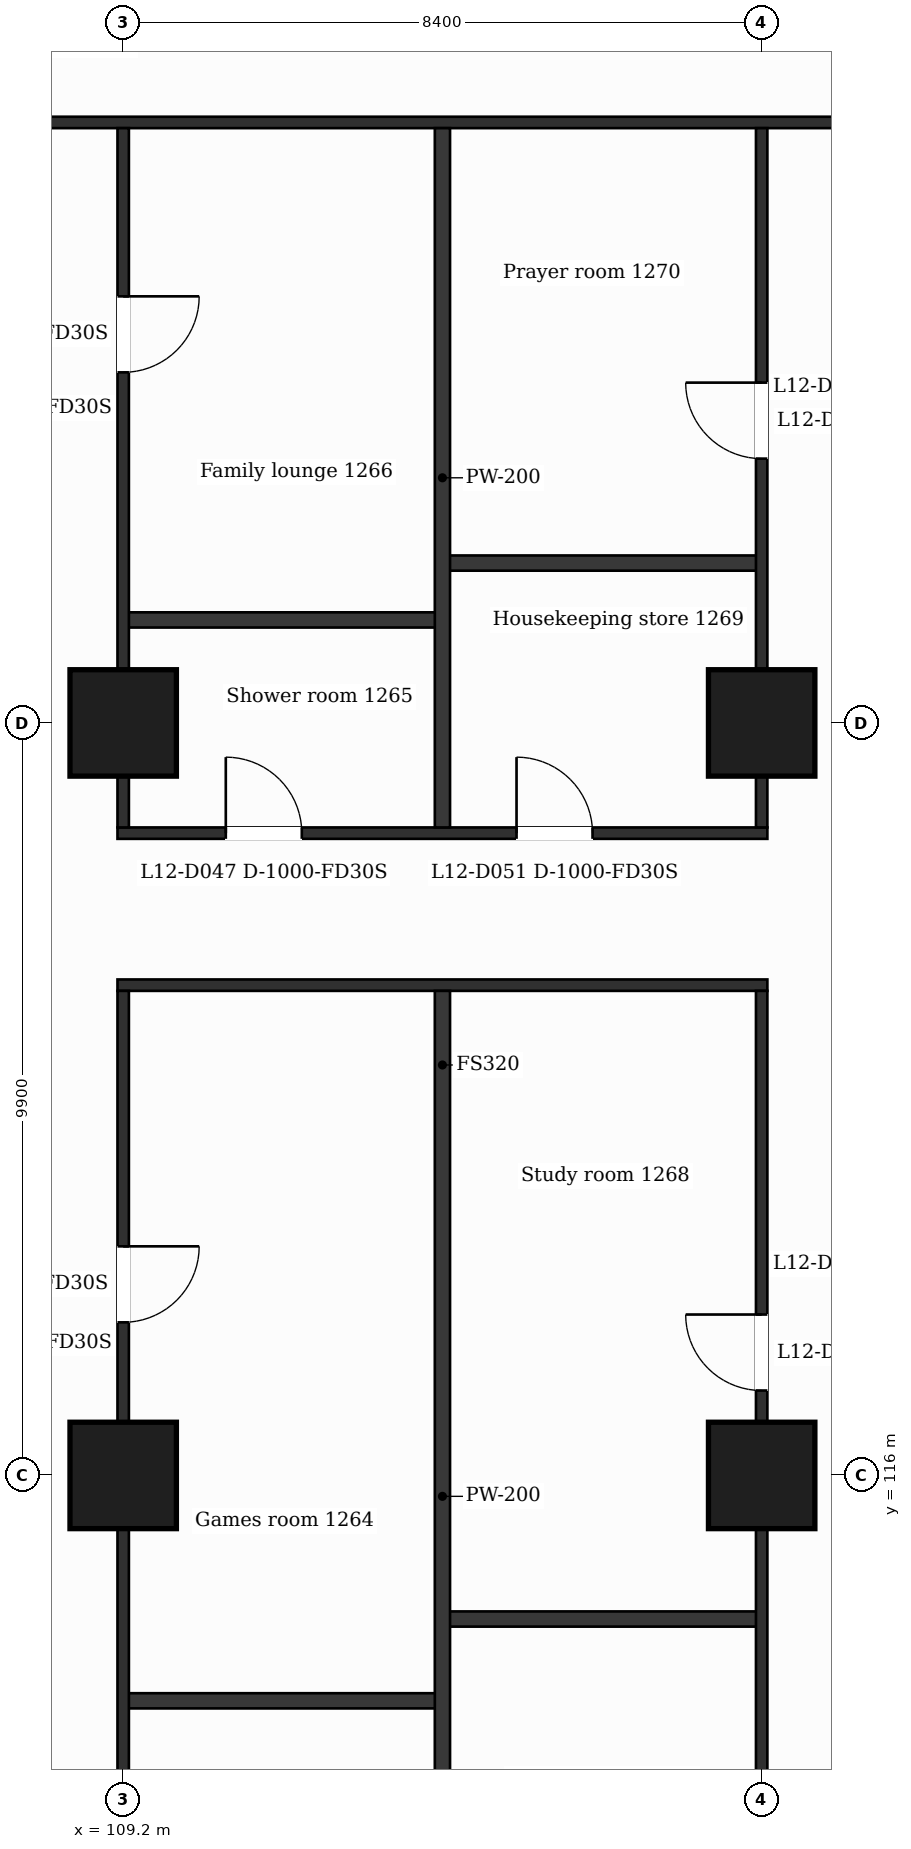
"""IFC4 building model, lengths in metres.
Left out: names, types, materials, properties, quantities, classifications, styles, units other than length and angle.
Written with IfcOpenShell. Run it as: python <this file> out.ifc"""

import sys

from ifc_helpers import new_model, si_unit, direction, frame, frame_2d, origin, origin_2d, place, context, subcontext, project, spatial, rectangle, extrude, element, fill, save


model = new_model("IFC4")
c1 = context("Model", 3, precision=1e-05, world=origin(), true_north=direction((0.0, 1.0)))
c2 = subcontext(c1, "Body", "Model", "MODEL_VIEW")
j1 = project(units=[si_unit("LENGTHUNIT", "METRE"), si_unit("PLANEANGLEUNIT", "RADIAN")], contexts=[c1])
p1 = place(None, origin())
s1 = spatial("IfcSite", under=j1, at=p1, CompositionType="ELEMENT")
p2 = place(p1, origin())
s2 = spatial("IfcBuilding", under=s1, at=p2, CompositionType="ELEMENT")
p3 = place(p2, frame((0.0, 0.0, 60.0)))
s3 = spatial("IfcBuildingStorey", under=s2, at=p3, CompositionType="ELEMENT", Elevation=60.0)
for number, where, z_axis, x_axis in (
    (1, (109.2, 116.0, 0.0), (0.0, 0.0, 1.0), (1.0, 0.0, 0.0)),
    (2, (117.6, 116.0, 0.0), (0.0, 0.0, 1.0), (1.0, 0.0, 0.0)),
    (3, (109.2, 125.9, 0.0), (0.0, 0.0, 1.0), (1.0, 0.0, 0.0)),
    (4, (117.6, 125.9, 0.0), (0.0, 0.0, 1.0), (1.0, 0.0, 0.0)),
):
    element("IfcColumn", number, at=place(p3, frame(where, z_axis=z_axis, x_axis=x_axis)), inside=s3, PredefinedType="COLUMN", context=c2, shape_type="SweptSolid", body=[
        extrude(rectangle(XDim=1.4, YDim=1.4, at=origin_2d()), origin(), (0.0, 0.0, 1.0), 3.5),
    ])
p4 = place(p3, frame((109.2, 113.035, 0.0), z_axis=(0.0, 0.0, 1.0), x_axis=(1.0, 0.0, 0.0)))
e5 = element("IfcWall", 5, at=p4, inside=s3, PredefinedType="PARTITIONING", context=c2, shape_type="SweptSolid", body=[
    extrude(rectangle(XDim=4.2, YDim=0.2, at=frame_2d((2.1, 0.0))), origin(), (0.0, 0.0, 1.0), 3.18),
])
p5 = place(p3, frame((113.4, 114.111, 0.0), z_axis=(0.0, 0.0, 1.0), x_axis=(1.0, 0.0, 0.0)))
e6 = element("IfcWall", 6, at=p5, inside=s3, PredefinedType="PARTITIONING", context=c2, shape_type="SweptSolid", body=[
    extrude(rectangle(XDim=4.2, YDim=0.2, at=frame_2d((2.1, 0.0))), origin(), (0.0, 0.0, 1.0), 3.18),
])
p6 = place(p3, frame((109.125, 122.45, 0.0), z_axis=(0.0, 0.0, 1.0), x_axis=(1.0, 0.0, 0.0)))
e7 = element("IfcWall", 7, at=p6, inside=s3, PredefinedType="PARTITIONING", context=c2, shape_type="SweptSolid", body=[
    extrude(rectangle(XDim=8.55, YDim=0.15, at=frame_2d((4.275, 0.0))), origin(), (0.0, 0.0, 1.0), 3.18),
])
p7 = place(p3, frame((109.125, 124.45, 0.0), z_axis=(0.0, 0.0, 1.0), x_axis=(1.0, 0.0, 0.0)))
e8 = element("IfcWall", 8, at=p7, inside=s3, PredefinedType="PARTITIONING", context=c2, shape_type="SweptSolid", body=[
    extrude(rectangle(XDim=8.55, YDim=0.15, at=frame_2d((4.275, 0.0))), origin(), (0.0, 0.0, 1.0), 3.18),
])
p8 = place(p7, frame((1.425, 0.0, 0.0)))
e9 = element("IfcOpeningElement", 9, at=p8, cuts=e8, PredefinedType="OPENING", context=c2, shape_type="SweptSolid", body=[
    extrude(rectangle(XDim=1.0, YDim=2.1, at=frame_2d((0.5, 1.05))), frame((0.0, 0.085, 0.0), z_axis=(0.0, -1.0, 0.0), x_axis=(1.0, 0.0, 0.0)), (0.0, 0.0, 1.0), 0.17),
])
p9 = place(p7, frame((5.25, 0.0, 0.0)))
e10 = element("IfcOpeningElement", 10, at=p9, cuts=e8, PredefinedType="OPENING", context=c2, shape_type="SweptSolid", body=[
    extrude(rectangle(XDim=1.0, YDim=2.1, at=frame_2d((0.5, 1.05))), frame((0.0, 0.085, 0.0), z_axis=(0.0, -1.0, 0.0), x_axis=(1.0, 0.0, 0.0)), (0.0, 0.0, 1.0), 0.17),
])
p10 = place(p3, frame((109.2, 127.255, 0.0), z_axis=(0.0, 0.0, 1.0), x_axis=(1.0, 0.0, 0.0)))
e11 = element("IfcWall", 11, at=p10, inside=s3, PredefinedType="PARTITIONING", context=c2, shape_type="SweptSolid", body=[
    extrude(rectangle(XDim=4.2, YDim=0.2, at=frame_2d((2.1, 0.0))), origin(), (0.0, 0.0, 1.0), 3.18),
])
p11 = place(p3, frame((113.4, 128.003, 0.0), z_axis=(0.0, 0.0, 1.0), x_axis=(1.0, 0.0, 0.0)))
e12 = element("IfcWall", 12, at=p11, inside=s3, PredefinedType="PARTITIONING", context=c2, shape_type="SweptSolid", body=[
    extrude(rectangle(XDim=4.2, YDim=0.2, at=frame_2d((2.1, 0.0))), origin(), (0.0, 0.0, 1.0), 3.18),
])
p12 = place(p3, frame((100.725, 133.8, 0.0), z_axis=(0.0, 0.0, 1.0), x_axis=(1.0, 0.0, 0.0)))
e13 = element("IfcWall", 13, at=p12, inside=s3, PredefinedType="PARTITIONING", context=c2, shape_type="SweptSolid", body=[
    extrude(rectangle(XDim=25.35, YDim=0.15, at=frame_2d((12.675, 0.0))), origin(), (0.0, 0.0, 1.0), 3.18),
])
p13 = place(p3, frame((109.2, 109.075, 0.0), z_axis=(0.0, 0.0, 1.0), x_axis=(0.0, 1.0, 0.0)))
e14 = element("IfcWall", 14, at=p13, inside=s3, PredefinedType="PARTITIONING", context=c2, shape_type="SweptSolid", body=[
    extrude(rectangle(XDim=13.3, YDim=0.15, at=frame_2d((6.65, 0.0))), origin(), (0.0, 0.0, 1.0), 3.18),
])
p14 = place(p13, frame((8.939, 0.0, 0.0)))
e15 = element("IfcOpeningElement", 15, at=p14, cuts=e14, PredefinedType="OPENING", context=c2, shape_type="SweptSolid", body=[
    extrude(rectangle(XDim=1.0, YDim=2.1, at=frame_2d((0.5, 1.05))), frame((0.0, 0.085, 0.0), z_axis=(0.0, -1.0, 0.0), x_axis=(1.0, 0.0, 0.0)), (0.0, 0.0, 1.0), 0.17),
])
p15 = place(p3, frame((109.2, 124.525, 0.0), z_axis=(0.0, 0.0, 1.0), x_axis=(0.0, 1.0, 0.0)))
e16 = element("IfcWall", 16, at=p15, inside=s3, PredefinedType="PARTITIONING", context=c2, shape_type="SweptSolid", body=[
    extrude(rectangle(XDim=9.2, YDim=0.15, at=frame_2d((4.6, 0.0))), origin(), (0.0, 0.0, 1.0), 3.18),
])
p16 = place(p15, frame((5.987, 0.0, 0.0)))
e17 = element("IfcOpeningElement", 17, at=p16, cuts=e16, PredefinedType="OPENING", context=c2, shape_type="SweptSolid", body=[
    extrude(rectangle(XDim=1.0, YDim=2.1, at=frame_2d((0.5, 1.05))), frame((0.0, 0.085, 0.0), z_axis=(0.0, -1.0, 0.0), x_axis=(1.0, 0.0, 0.0)), (0.0, 0.0, 1.0), 0.17),
])
p17 = place(p3, frame((113.4, 109.075, 0.0), z_axis=(0.0, 0.0, 1.0), x_axis=(0.0, 1.0, 0.0)))
e18 = element("IfcWall", 18, at=p17, inside=s3, PredefinedType="PARTITIONING", context=c2, shape_type="SweptSolid", body=[
    extrude(rectangle(XDim=13.3, YDim=0.2, at=frame_2d((6.65, 0.0))), origin(), (0.0, 0.0, 1.0), 3.18),
])
p18 = place(p3, frame((113.4, 124.525, 0.0), z_axis=(0.0, 0.0, 1.0), x_axis=(0.0, 1.0, 0.0)))
e19 = element("IfcWall", 19, at=p18, inside=s3, PredefinedType="PARTITIONING", context=c2, shape_type="SweptSolid", body=[
    extrude(rectangle(XDim=9.2, YDim=0.2, at=frame_2d((4.6, 0.0))), origin(), (0.0, 0.0, 1.0), 3.18),
])
p19 = place(p3, frame((117.6, 109.075, 0.0), z_axis=(0.0, 0.0, 1.0), x_axis=(0.0, 1.0, 0.0)))
e20 = element("IfcWall", 20, at=p19, inside=s3, PredefinedType="PARTITIONING", context=c2, shape_type="SweptSolid", body=[
    extrude(rectangle(XDim=13.3, YDim=0.15, at=frame_2d((6.65, 0.0))), origin(), (0.0, 0.0, 1.0), 3.18),
])
p20 = place(p19, frame((8.042, 0.0, 0.0)))
e21 = element("IfcOpeningElement", 21, at=p20, cuts=e20, PredefinedType="OPENING", context=c2, shape_type="SweptSolid", body=[
    extrude(rectangle(XDim=1.0, YDim=2.1, at=frame_2d((0.5, 1.05))), frame((0.0, 0.085, 0.0), z_axis=(0.0, -1.0, 0.0), x_axis=(1.0, 0.0, 0.0)), (0.0, 0.0, 1.0), 0.17),
])
p21 = place(p3, frame((117.6, 124.525, 0.0), z_axis=(0.0, 0.0, 1.0), x_axis=(0.0, 1.0, 0.0)))
e22 = element("IfcWall", 22, at=p21, inside=s3, PredefinedType="PARTITIONING", context=c2, shape_type="SweptSolid", body=[
    extrude(rectangle(XDim=9.2, YDim=0.15, at=frame_2d((4.6, 0.0))), origin(), (0.0, 0.0, 1.0), 3.18),
])
p22 = place(p21, frame((4.852, 0.0, 0.0)))
e23 = element("IfcOpeningElement", 23, at=p22, cuts=e22, PredefinedType="OPENING", context=c2, shape_type="SweptSolid", body=[
    extrude(rectangle(XDim=1.0, YDim=2.1, at=frame_2d((0.5, 1.05))), frame((0.0, 0.085, 0.0), z_axis=(0.0, -1.0, 0.0), x_axis=(1.0, 0.0, 0.0)), (0.0, 0.0, 1.0), 0.17),
])
p23 = place(p14, origin())
e24 = element("IfcDoor", 24, at=p23, inside=s3, OperationType="SINGLE_SWING_RIGHT", PredefinedType="DOOR", context=c2, shape_type="SweptSolid", body=[
    extrude(rectangle(XDim=1.0, YDim=2.1, at=frame_2d((0.5, 1.05))), frame((0.0, 0.025, 0.0), z_axis=(0.0, -1.0, 0.0), x_axis=(1.0, 0.0, 0.0)), (0.0, 0.0, 1.0), 0.05),
])
fill(e15, e24)
p24 = place(p8, origin())
e25 = element("IfcDoor", 25, at=p24, inside=s3, OperationType="SINGLE_SWING_LEFT", PredefinedType="DOOR", context=c2, shape_type="SweptSolid", body=[
    extrude(rectangle(XDim=1.0, YDim=2.1, at=frame_2d((0.5, 1.05))), frame((0.0, 0.025, 0.0), z_axis=(0.0, -1.0, 0.0), x_axis=(1.0, 0.0, 0.0)), (0.0, 0.0, 1.0), 0.05),
])
fill(e9, e25)
p25 = place(p16, origin())
e26 = element("IfcDoor", 26, at=p25, inside=s3, OperationType="SINGLE_SWING_RIGHT", PredefinedType="DOOR", context=c2, shape_type="SweptSolid", body=[
    extrude(rectangle(XDim=1.0, YDim=2.1, at=frame_2d((0.5, 1.05))), frame((0.0, 0.025, 0.0), z_axis=(0.0, -1.0, 0.0), x_axis=(1.0, 0.0, 0.0)), (0.0, 0.0, 1.0), 0.05),
])
fill(e17, e26)
p26 = place(p20, origin())
e27 = element("IfcDoor", 27, at=p26, inside=s3, OperationType="SINGLE_SWING_RIGHT", PredefinedType="DOOR", context=c2, shape_type="SweptSolid", body=[
    extrude(rectangle(XDim=1.0, YDim=2.1, at=frame_2d((0.5, 1.05))), frame((0.0, 0.025, 0.0), z_axis=(0.0, -1.0, 0.0), x_axis=(1.0, 0.0, 0.0)), (0.0, 0.0, 1.0), 0.05),
])
fill(e21, e27)
p27 = place(p9, origin())
e28 = element("IfcDoor", 28, at=p27, inside=s3, OperationType="SINGLE_SWING_LEFT", PredefinedType="DOOR", context=c2, shape_type="SweptSolid", body=[
    extrude(rectangle(XDim=1.0, YDim=2.1, at=frame_2d((0.5, 1.05))), frame((0.0, 0.025, 0.0), z_axis=(0.0, -1.0, 0.0), x_axis=(1.0, 0.0, 0.0)), (0.0, 0.0, 1.0), 0.05),
])
fill(e10, e28)
p28 = place(p22, origin())
e29 = element("IfcDoor", 29, at=p28, inside=s3, OperationType="SINGLE_SWING_RIGHT", PredefinedType="DOOR", context=c2, shape_type="SweptSolid", body=[
    extrude(rectangle(XDim=1.0, YDim=2.1, at=frame_2d((0.5, 1.05))), frame((0.0, 0.025, 0.0), z_axis=(0.0, -1.0, 0.0), x_axis=(1.0, 0.0, 0.0)), (0.0, 0.0, 1.0), 0.05),
])
fill(e23, e29)
save(model, sys.argv[1])
